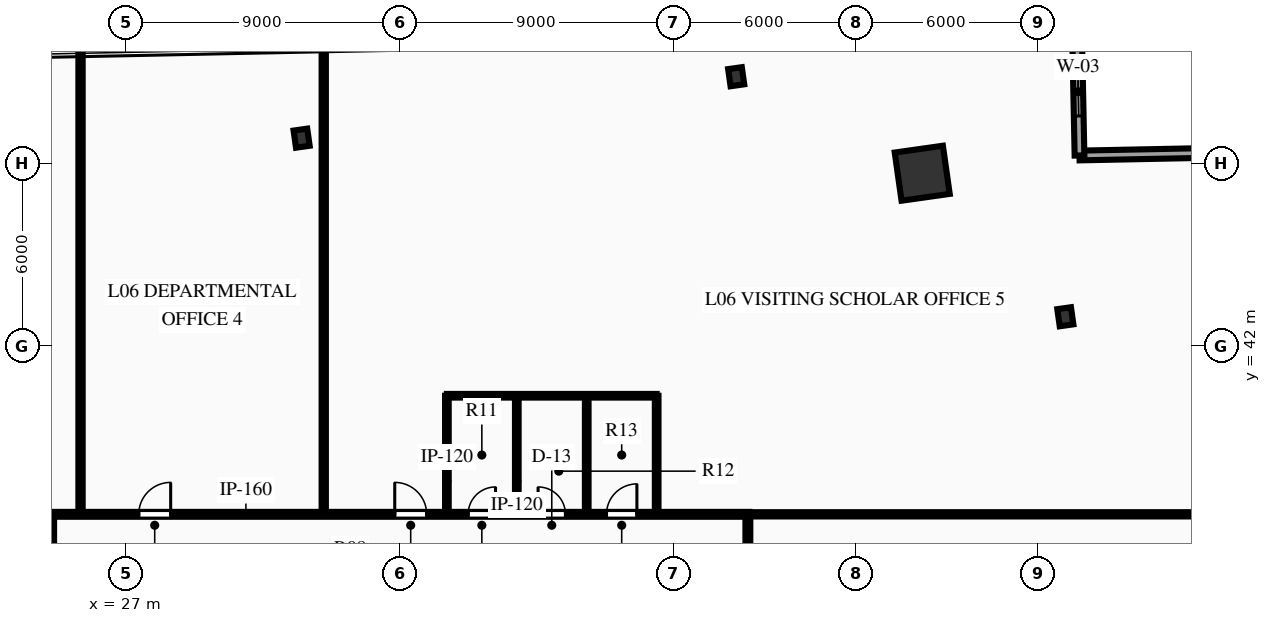
"""IFC4 building model, lengths in metres.
Left out: names, types, materials, properties, quantities, classifications, styles, units other than length and angle.
Written with IfcOpenShell. Run it as: python <this file> out.ifc"""

import sys

from ifc_helpers import new_model, si_unit, direction, frame, frame_2d, origin, origin_2d, place, context, subcontext, project, spatial, rectangle, hollow_rectangle, i_section, extrude, element, fill, save


model = new_model("IFC4")
c1 = context("Model", 3, precision=1e-05, world=origin(), true_north=direction((0.0, 1.0)))
c2 = subcontext(c1, "Body", "Model", "MODEL_VIEW")
j1 = project(units=[si_unit("LENGTHUNIT", "METRE"), si_unit("PLANEANGLEUNIT", "RADIAN")], contexts=[c1])
p1 = place(None, origin())
s1 = spatial("IfcSite", under=j1, at=p1, CompositionType="ELEMENT")
p2 = place(p1, origin())
s2 = spatial("IfcBuilding", under=s1, at=p2, CompositionType="ELEMENT")
p3 = place(p2, frame((0.0, 0.0, 32.7)))
s3 = spatial("IfcBuildingStorey", under=s2, at=p3, CompositionType="ELEMENT", Elevation=32.7)
p4 = place(p3, frame((53.185, 47.67, 0.0), z_axis=(0.0, 0.0, 1.0), x_axis=(0.990146240249, 0.140037219771, 0.0)))
e1 = element("IfcColumn", 1, at=p4, inside=s3, PredefinedType="COLUMN", context=c2, shape_type="SweptSolid", body=[
    extrude(hollow_rectangle(XDim=1.6, YDim=1.6, WallThickness=0.08, at=origin_2d()), origin(), (0.0, 0.0, 1.0), 3.75),
])
for number, where, z_axis, x_axis in (
    (2, (57.892, 42.949, 0.0), (0.0, 0.0, 1.0), (0.99, 0.14, 0.0)),
    (3, (47.066, 50.844, 0.0), (0.0, 0.0, 1.0), (0.99, 0.14, 0.0)),
    (4, (32.772, 48.823, 0.0), (0.0, 0.0, 1.0), (0.99, 0.14, 0.0)),
):
    element("IfcColumn", number, at=place(p3, frame(where, z_axis=z_axis, x_axis=x_axis)), inside=s3, PredefinedType="COLUMN", context=c2, shape_type="SweptSolid", body=[
        extrude(i_section(OverallWidth=0.454, OverallDepth=0.569, WebThickness=0.078, FlangeThickness=0.125, at=origin_2d()), origin(), (0.0, 0.0, 1.0), 3.75),
    ])
p5 = place(p3, frame((58.358, 48.253, 0.0), z_axis=(0.0, 0.0, 1.0), x_axis=(0.99979887282, 0.020055271302, 0.0)))
e5 = element("IfcWall", 5, at=p5, inside=s3, PredefinedType="STANDARD", context=c2, shape_type="SweptSolid", body=[
    extrude(rectangle(XDim=4.2, YDim=0.32, at=frame_2d((2.1, 0.0))), origin(), (0.0, 0.0, 1.0), 3.44),
])
p6 = place(p3, frame((58.274, 52.452, 0.0), z_axis=(0.0, 0.0, 1.0), x_axis=(0.020054105767, -0.9997988962, 0.0)))
e6 = element("IfcWall", 6, at=p6, inside=s3, PredefinedType="STANDARD", context=c2, shape_type="SweptSolid", body=[
    extrude(rectangle(XDim=4.2, YDim=0.32, at=frame_2d((2.1, 0.0))), origin(), (0.0, 0.0, 1.0), 3.44),
])
p7 = place(p6, frame((1.3, 0.0, 0.85)))
e7 = element("IfcOpeningElement", 7, at=p7, cuts=e6, PredefinedType="OPENING", context=c2, shape_type="SweptSolid", body=[
    extrude(rectangle(XDim=1.6, YDim=2.1, at=frame_2d((0.8, 1.05))), frame((0.0, 0.17, 0.0), z_axis=(0.0, -1.0, 0.0), x_axis=(1.0, 0.0, 0.0)), (0.0, 0.0, 1.0), 0.34),
])
p8 = place(p3, frame((24.5, 36.45, 0.0), z_axis=(0.0, 0.0, 1.0), x_axis=(1.0, 0.0, 0.0)))
e8 = element("IfcWall", 8, at=p8, inside=s3, PredefinedType="PARTITIONING", context=c2, shape_type="SweptSolid", body=[
    extrude(rectangle(XDim=23.0, YDim=0.16, at=frame_2d((11.5, 0.0))), origin(), (0.0, 0.0, 1.0), 3.44),
])
p9 = place(p8, frame((13.75, 0.0, 0.0)))
e9 = element("IfcOpeningElement", 9, at=p9, cuts=e8, PredefinedType="OPENING", context=c2, shape_type="SweptSolid", body=[
    extrude(rectangle(XDim=0.9, YDim=2.15, at=frame_2d((0.45, 1.075))), frame((0.0, 0.09, 0.0), z_axis=(0.0, -1.0, 0.0), x_axis=(1.0, 0.0, 0.0)), (0.0, 0.0, 1.0), 0.18),
])
p10 = place(p8, frame((16.05, 0.0, 0.0)))
e10 = element("IfcOpeningElement", 10, at=p10, cuts=e8, PredefinedType="OPENING", context=c2, shape_type="SweptSolid", body=[
    extrude(rectangle(XDim=0.9, YDim=2.15, at=frame_2d((0.45, 1.075))), frame((0.0, 0.09, 0.0), z_axis=(0.0, -1.0, 0.0), x_axis=(1.0, 0.0, 0.0)), (0.0, 0.0, 1.0), 0.18),
])
p11 = place(p8, frame((18.3, 0.0, 0.0)))
e11 = element("IfcOpeningElement", 11, at=p11, cuts=e8, PredefinedType="OPENING", context=c2, shape_type="SweptSolid", body=[
    extrude(rectangle(XDim=1.0, YDim=2.15, at=frame_2d((0.5, 1.075))), frame((0.0, 0.09, 0.0), z_axis=(0.0, -1.0, 0.0), x_axis=(1.0, 0.0, 0.0)), (0.0, 0.0, 1.0), 0.18),
])
p12 = place(p8, frame((2.915, 0.0, 0.0)))
e12 = element("IfcOpeningElement", 12, at=p12, cuts=e8, PredefinedType="OPENING", context=c2, shape_type="SweptSolid", body=[
    extrude(rectangle(XDim=1.05, YDim=2.15, at=frame_2d((0.525, 1.075))), frame((0.0, 0.09, 0.0), z_axis=(0.0, -1.0, 0.0), x_axis=(1.0, 0.0, 0.0)), (0.0, 0.0, 1.0), 0.18),
])
p13 = place(p8, frame((11.335, 0.0, 0.0)))
e13 = element("IfcOpeningElement", 13, at=p13, cuts=e8, PredefinedType="OPENING", context=c2, shape_type="SweptSolid", body=[
    extrude(rectangle(XDim=1.05, YDim=2.15, at=frame_2d((0.525, 1.075))), frame((0.0, 0.09, 0.0), z_axis=(0.0, -1.0, 0.0), x_axis=(1.0, 0.0, 0.0)), (0.0, 0.0, 1.0), 0.18),
])
p14 = place(p3, frame((24.55, 15.55, 0.0), z_axis=(0.0, 0.0, 1.0), x_axis=(0.0, 1.0, 0.0)))
e14 = element("IfcWall", 14, at=p14, inside=s3, PredefinedType="PARTITIONING", context=c2, shape_type="SweptSolid", body=[
    extrude(rectangle(XDim=20.9, YDim=0.16, at=frame_2d((10.45, 0.0))), origin(), (0.0, 0.0, 1.0), 3.44),
])
p15 = place(p14, frame((2.052, 0.0, 0.0)))
e15 = element("IfcOpeningElement", 15, at=p15, cuts=e14, PredefinedType="OPENING", context=c2, shape_type="SweptSolid", body=[
    extrude(rectangle(XDim=1.05, YDim=2.15, at=frame_2d((0.525, 1.075))), frame((0.0, 0.09, 0.0), z_axis=(0.0, -1.0, 0.0), x_axis=(1.0, 0.0, 0.0)), (0.0, 0.0, 1.0), 0.18),
])
p16 = place(p14, frame((15.645, 0.0, 0.0)))
e16 = element("IfcOpeningElement", 16, at=p16, cuts=e14, PredefinedType="OPENING", context=c2, shape_type="SweptSolid", body=[
    extrude(rectangle(XDim=1.05, YDim=2.15, at=frame_2d((0.525, 1.075))), frame((0.0, 0.09, 0.0), z_axis=(0.0, -1.0, 0.0), x_axis=(1.0, 0.0, 0.0)), (0.0, 0.0, 1.0), 0.18),
])
p17 = place(p3, frame((47.45, 15.55, 0.0), z_axis=(0.0, 0.0, 1.0), x_axis=(0.0, 1.0, 0.0)))
e17 = element("IfcWall", 17, at=p17, inside=s3, PredefinedType="PARTITIONING", context=c2, shape_type="SweptSolid", body=[
    extrude(rectangle(XDim=20.9, YDim=0.16, at=frame_2d((10.45, 0.0))), origin(), (0.0, 0.0, 1.0), 3.44),
])
p18 = place(p17, frame((3.747, 0.0, 0.0)))
e18 = element("IfcOpeningElement", 18, at=p18, cuts=e17, PredefinedType="OPENING", context=c2, shape_type="SweptSolid", body=[
    extrude(rectangle(XDim=1.05, YDim=2.15, at=frame_2d((0.525, 1.075))), frame((0.0, 0.09, 0.0), z_axis=(0.0, -1.0, 0.0), x_axis=(1.0, 0.0, 0.0)), (0.0, 0.0, 1.0), 0.18),
])
p19 = place(p17, frame((7.865, 0.0, 0.0)))
e19 = element("IfcOpeningElement", 19, at=p19, cuts=e17, PredefinedType="OPENING", context=c2, shape_type="SweptSolid", body=[
    extrude(rectangle(XDim=1.05, YDim=2.15, at=frame_2d((0.525, 1.075))), frame((0.0, 0.09, 0.0), z_axis=(0.0, -1.0, 0.0), x_axis=(1.0, 0.0, 0.0)), (0.0, 0.0, 1.0), 0.18),
])
p20 = place(p17, frame((18.045, 0.0, 0.0)))
e20 = element("IfcOpeningElement", 20, at=p20, cuts=e17, PredefinedType="OPENING", context=c2, shape_type="SweptSolid", body=[
    extrude(rectangle(XDim=1.05, YDim=2.15, at=frame_2d((0.525, 1.075))), frame((0.0, 0.09, 0.0), z_axis=(0.0, -1.0, 0.0), x_axis=(1.0, 0.0, 0.0)), (0.0, 0.0, 1.0), 0.18),
])
for number, where, z_axis, x_axis in (
    (21, (37.55, 36.45, 0.0), (0.0, 0.0, 1.0), (0.0, 1.0, 0.0)),
    (22, (39.85, 36.45, 0.0), (0.0, 0.0, 1.0), (0.0, 1.0, 0.0)),
    (23, (42.15, 36.45, 0.0), (0.0, 0.0, 1.0), (0.0, 1.0, 0.0)),
    (24, (44.45, 36.45, 0.0), (0.0, 0.0, 1.0), (0.0, 1.0, 0.0)),
):
    element("IfcWall", number, at=place(p3, frame(where, z_axis=z_axis, x_axis=x_axis)), inside=s3, PredefinedType="PARTITIONING", context=c2, shape_type="SweptSolid", body=[
        extrude(rectangle(XDim=3.9, YDim=0.12, at=frame_2d((1.95, 0.0))), origin(), (0.0, 0.0, 1.0), 3.44),
    ])
p21 = place(p3, frame((37.55, 40.35, 0.0), z_axis=(0.0, 0.0, 1.0), x_axis=(1.0, 0.0, 0.0)))
e25 = element("IfcWall", 25, at=p21, inside=s3, PredefinedType="PARTITIONING", context=c2, shape_type="SweptSolid", body=[
    extrude(rectangle(XDim=6.9, YDim=0.12, at=frame_2d((3.45, 0.0))), origin(), (0.0, 0.0, 1.0), 3.44),
])
p22 = place(p3, frame((47.45, 36.45, 0.0), z_axis=(0.0, 0.0, 1.0), x_axis=(1.0, 0.0, 0.0)))
e26 = element("IfcWall", 26, at=p22, inside=s3, PredefinedType="PARTITIONING", context=c2, shape_type="SweptSolid", body=[
    extrude(rectangle(XDim=15.306, YDim=0.14, at=frame_2d((7.653, 0.0))), origin(), (0.0, 0.0, 1.0), 3.44),
])
p23 = place(p3, frame((25.5, 36.45, 0.0), z_axis=(0.0, 0.0, 1.0), x_axis=(0.0, 1.0, 0.0)))
e27 = element("IfcWall", 27, at=p23, inside=s3, PredefinedType="PARTITIONING", context=c2, shape_type="SweptSolid", body=[
    extrude(rectangle(XDim=15.304, YDim=0.14, at=frame_2d((7.652, 0.0))), origin(), (0.0, 0.0, 1.0), 3.44),
])
p24 = place(p3, frame((33.5, 36.45, 0.0), z_axis=(0.0, 0.0, 1.0), x_axis=(0.0, 1.0, 0.0)))
e28 = element("IfcWall", 28, at=p24, inside=s3, PredefinedType="PARTITIONING", context=c2, shape_type="SweptSolid", body=[
    extrude(rectangle(XDim=15.465, YDim=0.14, at=frame_2d((7.732, 0.0))), origin(), (0.0, 0.0, 1.0), 3.44),
])
p25 = place(p7, origin())
e29 = element("IfcWindow", 29, at=p25, inside=s3, PartitioningType="SINGLE_PANEL", PredefinedType="WINDOW", context=c2, shape_type="SweptSolid", body=[
    extrude(rectangle(XDim=1.6, YDim=2.1, at=frame_2d((0.8, 1.05))), frame((0.0, 0.03, 0.0), z_axis=(0.0, -1.0, 0.0), x_axis=(1.0, 0.0, 0.0)), (0.0, 0.0, 1.0), 0.06),
])
fill(e7, e29)
p26 = place(p9, origin())
e30 = element("IfcDoor", 30, at=p26, inside=s3, OperationType="SINGLE_SWING_RIGHT", PredefinedType="DOOR", context=c2, shape_type="SweptSolid", body=[
    extrude(rectangle(XDim=0.9, YDim=2.15, at=frame_2d((0.45, 1.075))), frame((0.0, 0.025, 0.0), z_axis=(0.0, -1.0, 0.0), x_axis=(1.0, 0.0, 0.0)), (0.0, 0.0, 1.0), 0.05),
])
fill(e9, e30)
p27 = place(p10, origin())
e31 = element("IfcDoor", 31, at=p27, inside=s3, OperationType="SINGLE_SWING_LEFT", PredefinedType="DOOR", context=c2, shape_type="SweptSolid", body=[
    extrude(rectangle(XDim=0.9, YDim=2.15, at=frame_2d((0.45, 1.075))), frame((0.0, 0.025, 0.0), z_axis=(0.0, -1.0, 0.0), x_axis=(1.0, 0.0, 0.0)), (0.0, 0.0, 1.0), 0.05),
])
fill(e10, e31)
p28 = place(p11, origin())
e32 = element("IfcDoor", 32, at=p28, inside=s3, OperationType="SINGLE_SWING_RIGHT", PredefinedType="DOOR", context=c2, shape_type="SweptSolid", body=[
    extrude(rectangle(XDim=1.0, YDim=2.15, at=frame_2d((0.5, 1.075))), frame((0.0, 0.025, 0.0), z_axis=(0.0, -1.0, 0.0), x_axis=(1.0, 0.0, 0.0)), (0.0, 0.0, 1.0), 0.05),
])
fill(e11, e32)
p29 = place(p12, origin())
e33 = element("IfcDoor", 33, at=p29, inside=s3, OperationType="SINGLE_SWING_RIGHT", PredefinedType="DOOR", context=c2, shape_type="SweptSolid", body=[
    extrude(rectangle(XDim=1.05, YDim=2.15, at=frame_2d((0.525, 1.075))), frame((0.0, 0.025, 0.0), z_axis=(0.0, -1.0, 0.0), x_axis=(1.0, 0.0, 0.0)), (0.0, 0.0, 1.0), 0.05),
])
fill(e12, e33)
p30 = place(p13, origin())
e34 = element("IfcDoor", 34, at=p30, inside=s3, OperationType="SINGLE_SWING_LEFT", PredefinedType="DOOR", context=c2, shape_type="SweptSolid", body=[
    extrude(rectangle(XDim=1.05, YDim=2.15, at=frame_2d((0.525, 1.075))), frame((0.0, 0.025, 0.0), z_axis=(0.0, -1.0, 0.0), x_axis=(1.0, 0.0, 0.0)), (0.0, 0.0, 1.0), 0.05),
])
fill(e13, e34)
save(model, sys.argv[1])
